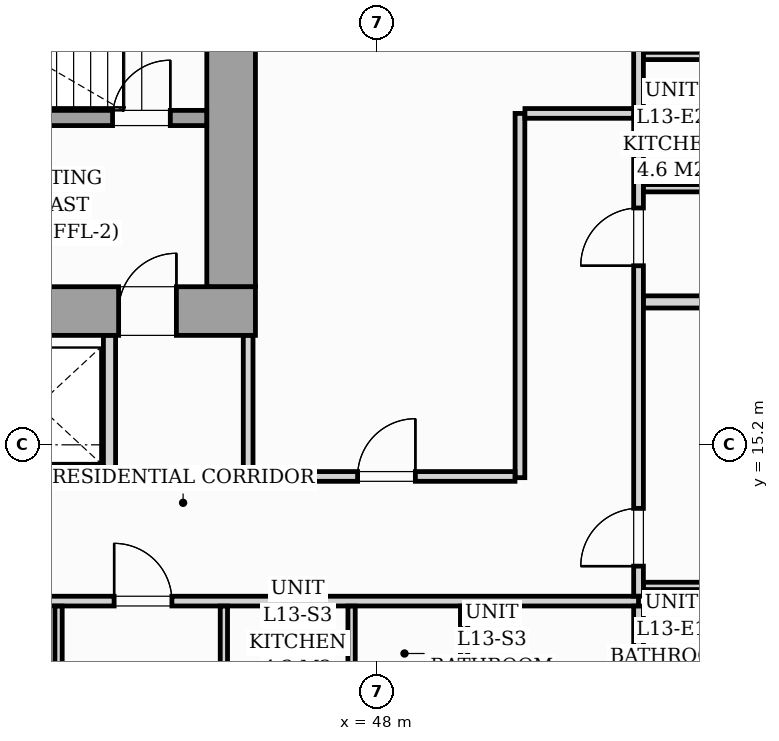
"""IFC4 building model, lengths in metres.
Left out: names, types, materials, properties, quantities, classifications, styles, units other than length and angle.
Written with IfcOpenShell. Run it as: python <this file> out.ifc"""

import sys

from ifc_helpers import new_model, si_unit, direction, frame, frame_2d, origin, origin_2d, place, context, subcontext, project, spatial, rectangle, i_section, extrude, source, transform, mapped, element, fill, save


model = new_model("IFC4")
c1 = context("Model", 3, precision=1e-05, world=origin(), true_north=direction((0.0, 1.0)))
c2 = subcontext(c1, "Body", "Model", "MODEL_VIEW")
j1 = project(units=[si_unit("LENGTHUNIT", "METRE"), si_unit("PLANEANGLEUNIT", "RADIAN")], contexts=[c1])
p1 = place(None, origin())
s1 = spatial("IfcSite", under=j1, at=p1, CompositionType="ELEMENT")
p2 = place(p1, origin())
s2 = spatial("IfcBuilding", under=s1, at=p2, CompositionType="ELEMENT")
p3 = place(p2, frame((0.0, 0.0, 48.6)))
s3 = spatial("IfcBuildingStorey", under=s2, at=p3, CompositionType="ELEMENT", Elevation=48.6)
m1 = source(origin(), c2, "Body", "SweptSolid", [
    extrude(i_section(OverallWidth=0.437, OverallDepth=0.514, WebThickness=0.061, FlangeThickness=0.097, FilletRadius=0.018, at=origin_2d()), origin(), (0.0, 0.0, 1.0), 3.196),
])
p4 = place(p3, frame((45.6, 17.4, 0.002), z_axis=(0.0, 0.0, 1.0), x_axis=(1.0, 0.0, 0.0)))
e1 = element("IfcColumn", 1, at=p4, inside=s3, PredefinedType="PILASTER", context=c2, shape_type="MappedRepresentation", body=[
    mapped(m1, transform((0.0, 0.0, 0.0), scale=1.0)),
])
p5 = place(p3, frame((26.0, 17.4, 0.0), z_axis=(0.0, 0.0, 1.0), x_axis=(1.0, 0.0, 0.0)))
e2 = element("IfcWall", 2, at=p5, inside=s3, PredefinedType="SHEAR", context=c2, shape_type="SweptSolid", body=[
    extrude(rectangle(XDim=20.0, YDim=0.8, at=frame_2d((10.0, 0.0))), origin(), (0.0, 0.0, 1.0), 3.2),
])
p6 = place(p5, frame((1.15, 0.0, 0.0)))
e3 = element("IfcOpeningElement", 3, at=p6, cuts=e2, PredefinedType="OPENING", context=c2, shape_type="SweptSolid", body=[
    extrude(rectangle(XDim=0.95, YDim=2.06, at=frame_2d((0.475, 1.03))), frame((0.0, 0.41, 0.0), z_axis=(0.0, -1.0, 0.0), x_axis=(1.0, 0.0, 0.0)), (0.0, 0.0, 1.0), 0.82),
])
p7 = place(p5, frame((9.58, 0.0, 0.0)))
e4 = element("IfcOpeningElement", 4, at=p7, cuts=e2, PredefinedType="OPENING", context=c2, shape_type="SweptSolid", body=[
    extrude(rectangle(XDim=0.85, YDim=2.0, at=frame_2d((0.425, 1.0))), frame((0.0, 0.41, 0.0), z_axis=(0.0, -1.0, 0.0), x_axis=(1.0, 0.0, 0.0)), (0.0, 0.0, 1.0), 0.82),
])
p8 = place(p5, frame((17.75, 0.0, 0.0)))
e5 = element("IfcOpeningElement", 5, at=p8, cuts=e2, PredefinedType="OPENING", context=c2, shape_type="SweptSolid", body=[
    extrude(rectangle(XDim=0.95, YDim=2.06, at=frame_2d((0.475, 1.03))), frame((0.0, 0.41, 0.0), z_axis=(0.0, -1.0, 0.0), x_axis=(1.0, 0.0, 0.0)), (0.0, 0.0, 1.0), 0.82),
])
p9 = place(p3, frame((45.6, 17.802, 0.0), z_axis=(0.0, 0.0, 1.0), x_axis=(0.0, 1.0, 0.0)))
e6 = element("IfcWall", 6, at=p9, inside=s3, PredefinedType="SHEAR", context=c2, shape_type="SweptSolid", body=[
    extrude(rectangle(XDim=5.796, YDim=0.8, at=frame_2d((2.898, 0.0))), origin(), (0.0, 0.0, 1.0), 3.2),
])
p10 = place(p3, frame((37.05, 20.575, 0.0), z_axis=(0.0, 0.0, 1.0), x_axis=(1.0, 0.0, 0.0)))
e7 = element("IfcWall", 7, at=p10, inside=s3, PredefinedType="SOLIDWALL", context=c2, shape_type="SweptSolid", body=[
    extrude(rectangle(XDim=8.148, YDim=0.25, at=frame_2d((4.074, 0.0))), origin(), (0.0, 0.0, 1.0), 3.2),
])
p11 = place(p10, frame((6.6, 0.0, 0.0)))
e8 = element("IfcOpeningElement", 8, at=p11, cuts=e7, PredefinedType="OPENING", context=c2, shape_type="SweptSolid", body=[
    extrude(rectangle(XDim=0.95, YDim=2.06, at=frame_2d((0.475, 1.03))), frame((0.0, 0.135, 0.0), z_axis=(0.0, -1.0, 0.0), x_axis=(1.0, 0.0, 0.0)), (0.0, 0.0, 1.0), 0.27),
])
p12 = place(p3, frame((43.6, 14.75, 0.0), z_axis=(0.0, 0.0, 1.0), x_axis=(0.0, 1.0, 0.0)))
e9 = element("IfcWall", 9, at=p12, inside=s3, PredefinedType="PARTITIONING", context=c2, shape_type="SweptSolid", body=[
    extrude(rectangle(XDim=2.248, YDim=0.2, at=frame_2d((1.124, 0.0))), origin(), (0.0, 0.0, 1.0), 2.94),
])
p13 = place(p3, frame((41.352, 14.75, 0.0), z_axis=(0.0, 0.0, 1.0), x_axis=(1.0, 0.0, 0.0)))
e10 = element("IfcWall", 10, at=p13, inside=s3, PredefinedType="PARTITIONING", context=c2, shape_type="SweptSolid", body=[
    extrude(rectangle(XDim=2.146, YDim=0.2, at=frame_2d((1.073, 0.0))), origin(), (0.0, 0.0, 1.0), 2.94),
])
p14 = place(p3, frame((15.2, 12.63, 0.0), z_axis=(0.0, 0.0, 1.0), x_axis=(1.0, 0.0, 0.0)))
e11 = element("IfcWall", 11, at=p14, inside=s3, PredefinedType="PARTITIONING", context=c2, shape_type="SweptSolid", body=[
    extrude(rectangle(XDim=37.1, YDim=0.16, at=frame_2d((18.55, 0.0))), origin(), (0.0, 0.0, 1.0), 2.94),
])
p15 = place(p14, frame((1.572, 0.0, 0.0)))
e12 = element("IfcOpeningElement", 12, at=p15, cuts=e11, PredefinedType="OPENING", context=c2, shape_type="SweptSolid", body=[
    extrude(rectangle(XDim=0.95, YDim=2.06, at=frame_2d((0.475, 1.03))), frame((0.0, 0.09, 0.0), z_axis=(0.0, -1.0, 0.0), x_axis=(1.0, 0.0, 0.0)), (0.0, 0.0, 1.0), 0.18),
])
p16 = place(p14, frame((14.877, 0.0, 0.0)))
e13 = element("IfcOpeningElement", 13, at=p16, cuts=e11, PredefinedType="OPENING", context=c2, shape_type="SweptSolid", body=[
    extrude(rectangle(XDim=0.95, YDim=2.06, at=frame_2d((0.475, 1.03))), frame((0.0, 0.09, 0.0), z_axis=(0.0, -1.0, 0.0), x_axis=(1.0, 0.0, 0.0)), (0.0, 0.0, 1.0), 0.18),
])
p17 = place(p14, frame((28.476, 0.0, 0.0)))
e14 = element("IfcOpeningElement", 14, at=p17, cuts=e11, PredefinedType="OPENING", context=c2, shape_type="SweptSolid", body=[
    extrude(rectangle(XDim=0.95, YDim=2.06, at=frame_2d((0.475, 1.03))), frame((0.0, 0.09, 0.0), z_axis=(0.0, -1.0, 0.0), x_axis=(1.0, 0.0, 0.0)), (0.0, 0.0, 1.0), 0.18),
])
p18 = place(p3, frame((52.3, 2.962, 0.0), z_axis=(0.0, 0.0, 1.0), x_axis=(0.0, 1.0, 0.0)))
e15 = element("IfcWall", 15, at=p18, inside=s3, PredefinedType="PARTITIONING", context=c2, shape_type="SweptSolid", body=[
    extrude(rectangle(XDim=9.586, YDim=0.16, at=frame_2d((4.793, 0.0))), origin(), (0.0, 0.0, 1.0), 2.94),
])
p19 = place(p3, frame((52.3, 12.712, 0.0), z_axis=(0.0, 0.0, 1.0), x_axis=(0.0, 1.0, 0.0)))
e16 = element("IfcWall", 16, at=p19, inside=s3, PredefinedType="PARTITIONING", context=c2, shape_type="SweptSolid", body=[
    extrude(rectangle(XDim=14.726, YDim=0.16, at=frame_2d((7.363, 0.0))), origin(), (0.0, 0.0, 1.0), 2.94),
])
p20 = place(p19, frame((0.493, 0.0, 0.0)))
e17 = element("IfcOpeningElement", 17, at=p20, cuts=e16, PredefinedType="OPENING", context=c2, shape_type="SweptSolid", body=[
    extrude(rectangle(XDim=0.95, YDim=2.06, at=frame_2d((0.475, 1.03))), frame((0.0, 0.09, 0.0), z_axis=(0.0, -1.0, 0.0), x_axis=(1.0, 0.0, 0.0)), (0.0, 0.0, 1.0), 0.18),
])
p21 = place(p19, frame((5.433, 0.0, 0.0)))
e18 = element("IfcOpeningElement", 18, at=p21, cuts=e16, PredefinedType="OPENING", context=c2, shape_type="SweptSolid", body=[
    extrude(rectangle(XDim=0.95, YDim=2.06, at=frame_2d((0.475, 1.03))), frame((0.0, 0.09, 0.0), z_axis=(0.0, -1.0, 0.0), x_axis=(1.0, 0.0, 0.0)), (0.0, 0.0, 1.0), 0.18),
])
p22 = place(p3, frame((49.431, 2.962, 0.0), z_axis=(0.0, 0.0, 1.0), x_axis=(0.0, 1.0, 0.0)))
e19 = element("IfcWall", 19, at=p22, inside=s3, PredefinedType="PARTITIONING", context=c2, shape_type="SweptSolid", body=[
    extrude(rectangle(XDim=9.586, YDim=0.12, at=frame_2d((4.793, 0.0))), origin(), (0.0, 0.0, 1.0), 2.94),
])
p23 = place(p22, frame((6.318, 0.0, 0.0)))
e20 = element("IfcOpeningElement", 20, at=p23, cuts=e19, PredefinedType="OPENING", context=c2, shape_type="SweptSolid", body=[
    extrude(rectangle(XDim=0.9, YDim=2.05, at=frame_2d((0.45, 1.025))), frame((0.0, 0.07, 0.0), z_axis=(0.0, -1.0, 0.0), x_axis=(1.0, 0.0, 0.0)), (0.0, 0.0, 1.0), 0.14),
])
for number, where, z_axis, x_axis in (
    (21, (47.581, 10.442, 0.0), (0.0, 0.0, 1.0), (0.0, 1.0, 0.0)),
    (22, (45.481, 10.442, 0.0), (0.0, 0.0, 1.0), (0.0, 1.0, 0.0)),
):
    element("IfcWall", number, at=place(p3, frame(where, z_axis=z_axis, x_axis=x_axis)), inside=s3, PredefinedType="PARTITIONING", context=c2, shape_type="SweptSolid", body=[
        extrude(rectangle(XDim=2.106, YDim=0.12, at=frame_2d((1.053, 0.0))), origin(), (0.0, 0.0, 1.0), 2.94),
    ])
p24 = place(p3, frame((42.762, 2.962, 0.0), z_axis=(0.0, 0.0, 1.0), x_axis=(0.0, 1.0, 0.0)))
e23 = element("IfcWall", 23, at=p24, inside=s3, PredefinedType="PARTITIONING", context=c2, shape_type="SweptSolid", body=[
    extrude(rectangle(XDim=9.586, YDim=0.12, at=frame_2d((4.793, 0.0))), origin(), (0.0, 0.0, 1.0), 2.94),
])
p25 = place(p24, frame((4.358, 0.0, 0.0)))
e24 = element("IfcOpeningElement", 24, at=p25, cuts=e23, PredefinedType="OPENING", context=c2, shape_type="SweptSolid", body=[
    extrude(rectangle(XDim=0.85, YDim=2.05, at=frame_2d((0.425, 1.025))), frame((0.0, 0.07, 0.0), z_axis=(0.0, -1.0, 0.0), x_axis=(1.0, 0.0, 0.0)), (0.0, 0.0, 1.0), 0.14),
])
p26 = place(p3, frame((52.382, 17.55, 0.0), z_axis=(0.0, 0.0, 1.0), x_axis=(1.0, 0.0, 0.0)))
e25 = element("IfcWall", 25, at=p26, inside=s3, PredefinedType="PARTITIONING", context=c2, shape_type="SweptSolid", body=[
    extrude(rectangle(XDim=7.338, YDim=0.2, at=frame_2d((3.669, 0.0))), origin(), (0.0, 0.0, 1.0), 2.94),
])
for number, where, z_axis, x_axis in (
    (26, (52.382, 12.88, 0.0), (0.0, 0.0, 1.0), (1.0, 0.0, 0.0)),
    (27, (52.382, 21.595, 0.0), (0.0, 0.0, 1.0), (1.0, 0.0, 0.0)),
    (28, (52.382, 19.42, 0.0), (0.0, 0.0, 1.0), (1.0, 0.0, 0.0)),
):
    element("IfcWall", number, at=place(p3, frame(where, z_axis=z_axis, x_axis=x_axis)), inside=s3, PredefinedType="PARTITIONING", context=c2, shape_type="SweptSolid", body=[
        extrude(rectangle(XDim=2.256, YDim=0.12, at=frame_2d((1.128, 0.0))), origin(), (0.0, 0.0, 1.0), 2.94),
    ])
p27 = place(p3, frame((50.35, 14.66, 0.0), z_axis=(0.0, 0.0, 1.0), x_axis=(0.0, 1.0, 0.0)))
e29 = element("IfcWall", 29, at=p27, inside=s3, PredefinedType="PARTITIONING", context=c2, shape_type="SweptSolid", body=[
    extrude(rectangle(XDim=5.99, YDim=0.16, at=frame_2d((2.995, 0.0))), origin(), (0.0, 0.0, 1.0), 2.94),
])
p28 = place(p3, frame((50.432, 20.65, 0.0), z_axis=(0.0, 0.0, 1.0), x_axis=(1.0, 0.0, 0.0)))
e30 = element("IfcWall", 30, at=p28, inside=s3, PredefinedType="PARTITIONING", context=c2, shape_type="SweptSolid", body=[
    extrude(rectangle(XDim=1.786, YDim=0.16, at=frame_2d((0.893, 0.0))), origin(), (0.0, 0.0, 1.0), 2.94),
])
p29 = place(p3, frame((45.84, 14.68, 0.0), z_axis=(0.0, 0.0, 1.0), x_axis=(1.0, 0.0, 0.0)))
e31 = element("IfcWall", 31, at=p29, inside=s3, PredefinedType="PARTITIONING", context=c2, shape_type="SweptSolid", body=[
    extrude(rectangle(XDim=4.428, YDim=0.16, at=frame_2d((2.214, 0.0))), origin(), (0.0, 0.0, 1.0), 2.94),
])
p30 = place(p29, frame((1.84, 0.0, 0.0)))
e32 = element("IfcOpeningElement", 32, at=p30, cuts=e31, PredefinedType="OPENING", context=c2, shape_type="SweptSolid", body=[
    extrude(rectangle(XDim=0.95, YDim=2.06, at=frame_2d((0.475, 1.03))), frame((0.0, 0.09, 0.0), z_axis=(0.0, -1.0, 0.0), x_axis=(1.0, 0.0, 0.0)), (0.0, 0.0, 1.0), 0.18),
])
p31 = place(p3, frame((45.88, 14.762, 0.0), z_axis=(0.0, 0.0, 1.0), x_axis=(0.0, 1.0, 0.0)))
e33 = element("IfcWall", 33, at=p31, inside=s3, PredefinedType="PARTITIONING", context=c2, shape_type="SweptSolid", body=[
    extrude(rectangle(XDim=2.236, YDim=0.16, at=frame_2d((1.118, 0.0))), origin(), (0.0, 0.0, 1.0), 2.94),
])
m2 = source(origin(), c2, "Body", "SweptSolid", [
    extrude(rectangle(XDim=0.95, YDim=2.06, at=frame_2d((0.475, 1.03))), frame((0.0, 0.025, 0.0), z_axis=(0.0, -1.0, 0.0), x_axis=(1.0, 0.0, 0.0)), (0.0, 0.0, 1.0), 0.05),
])
p32 = place(p8, origin())
e34 = element("IfcDoor", 34, at=p32, inside=s3, OperationType="SINGLE_SWING_RIGHT", PredefinedType="DOOR", context=c2, shape_type="MappedRepresentation", body=[
    mapped(m2, transform((0.0, 0.0, 0.0), scale=1.0)),
])
fill(e5, e34)
p33 = place(p11, origin())
e35 = element("IfcDoor", 35, at=p33, inside=s3, OperationType="SINGLE_SWING_RIGHT", PredefinedType="DOOR", context=c2, shape_type="MappedRepresentation", body=[
    mapped(m2, transform((0.0, 0.0, 0.0), scale=1.0)),
])
fill(e8, e35)
m3 = source(origin(), c2, "Body", "SweptSolid", [
    extrude(rectangle(XDim=0.95, YDim=2.06, at=frame_2d((0.475, 1.03))), frame((0.0, 0.025, 0.0), z_axis=(0.0, -1.0, 0.0), x_axis=(1.0, 0.0, 0.0)), (0.0, 0.0, 1.0), 0.05),
])
p34 = place(p17, origin())
e36 = element("IfcDoor", 36, at=p34, inside=s3, OperationType="SINGLE_SWING_LEFT", PredefinedType="DOOR", context=c2, shape_type="MappedRepresentation", body=[
    mapped(m3, transform((0.0, 0.0, 0.0), scale=1.0)),
])
fill(e14, e36)
p35 = place(p20, origin())
e37 = element("IfcDoor", 37, at=p35, inside=s3, OperationType="SINGLE_SWING_LEFT", PredefinedType="DOOR", context=c2, shape_type="MappedRepresentation", body=[
    mapped(m3, transform((0.0, 0.0, 0.0), scale=1.0)),
])
fill(e17, e37)
p36 = place(p21, origin())
e38 = element("IfcDoor", 38, at=p36, inside=s3, OperationType="SINGLE_SWING_LEFT", PredefinedType="DOOR", context=c2, shape_type="MappedRepresentation", body=[
    mapped(m3, transform((0.0, 0.0, 0.0), scale=1.0)),
])
fill(e18, e38)
p37 = place(p30, origin())
e39 = element("IfcDoor", 39, at=p37, inside=s3, OperationType="SINGLE_SWING_RIGHT", PredefinedType="DOOR", context=c2, shape_type="MappedRepresentation", body=[
    mapped(m3, transform((0.0, 0.0, 0.0), scale=1.0)),
])
fill(e32, e39)
save(model, sys.argv[1])
